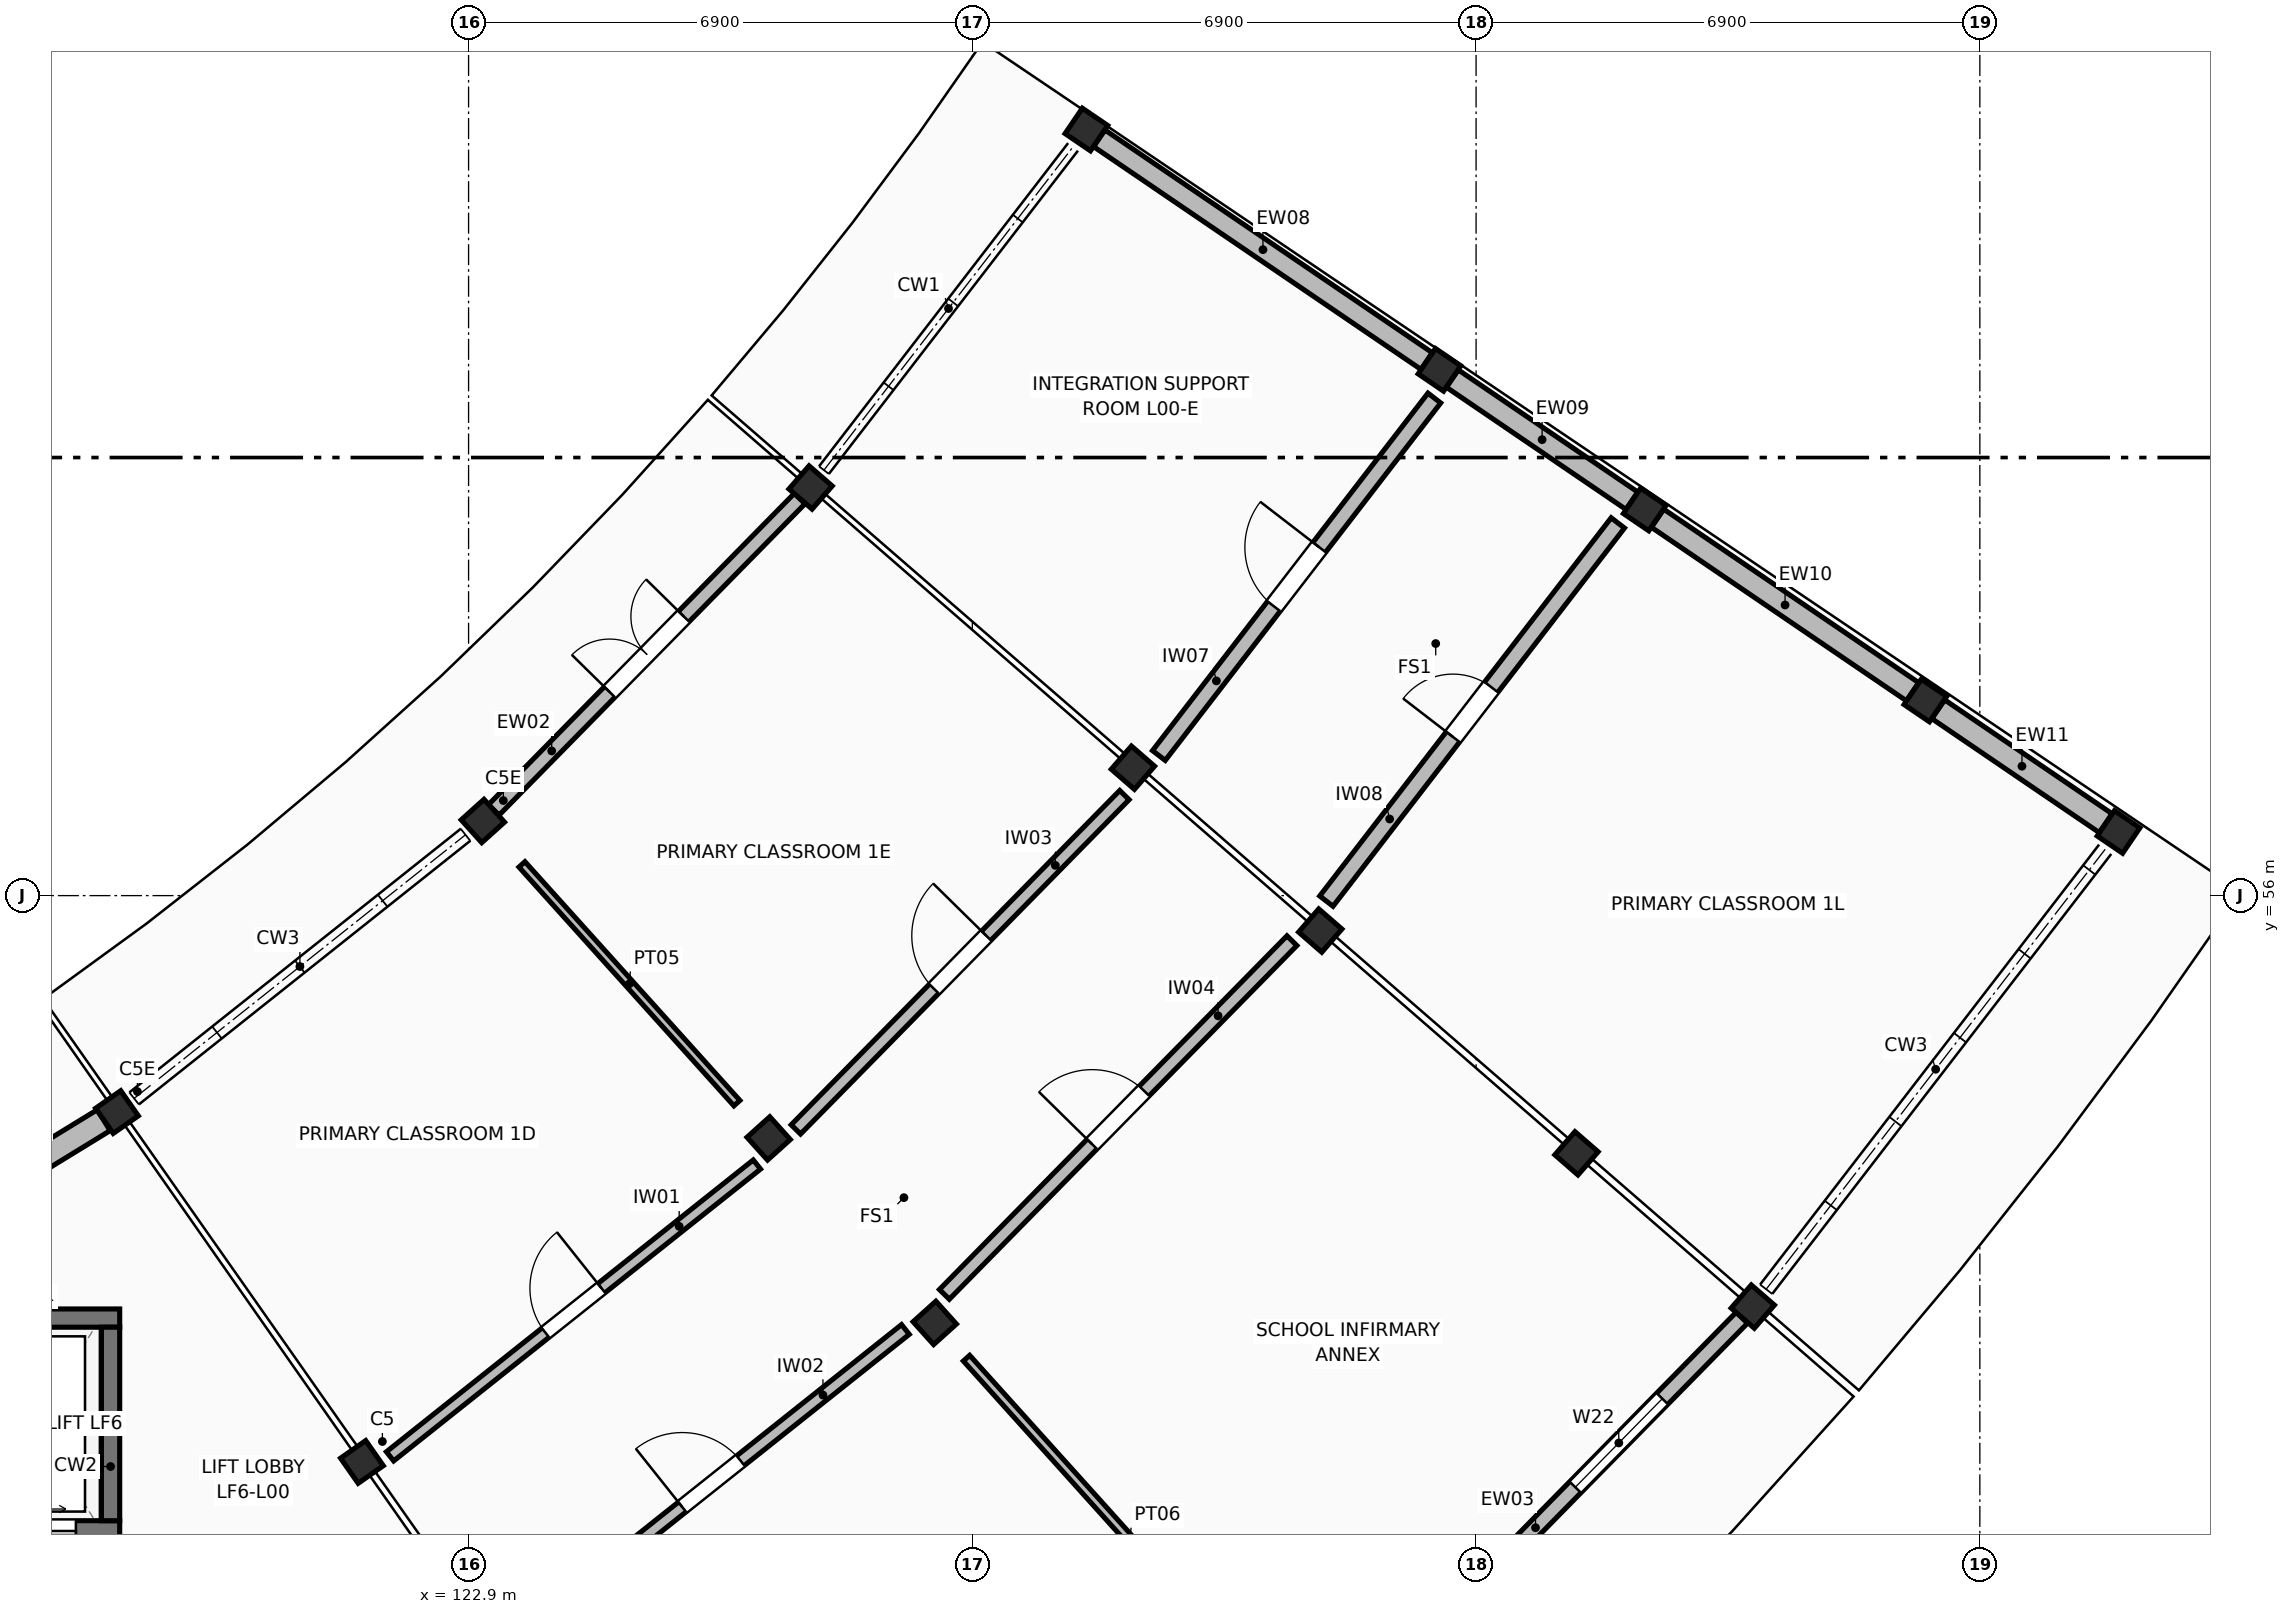
"""IFC4 building model, lengths in metres.
Left out: names, types, materials, properties, quantities, classifications, styles, units other than length and angle.
Written with IfcOpenShell. Run it as: python <this file> out.ifc"""

import sys

from ifc_helpers import new_model, si_unit, direction, frame, frame_2d, origin, origin_2d, place, context, subcontext, project, spatial, rectangle, extrude, element, fill, save


model = new_model("IFC4")
c1 = context("Model", 3, precision=1e-05, world=origin(), true_north=direction((0.0, 1.0)))
c2 = subcontext(c1, "Body", "Model", "MODEL_VIEW")
j1 = project(units=[si_unit("LENGTHUNIT", "METRE"), si_unit("PLANEANGLEUNIT", "RADIAN")], contexts=[c1])
p1 = place(None, origin())
s1 = spatial("IfcSite", under=j1, at=p1, CompositionType="ELEMENT")
p2 = place(p1, origin())
s2 = spatial("IfcBuilding", under=s1, at=p2, CompositionType="ELEMENT")
p3 = place(p2, origin())
s3 = spatial("IfcBuildingStorey", under=s2, at=p3, CompositionType="ELEMENT", Elevation=0.0)
for number, where, z_axis, x_axis in (
    (1, (118.084, 53.035, 0.0), (0.0, 0.0, 1.0), (0.574, -0.819, 0.0)),
    (2, (121.439, 48.243, 0.0), (0.0, 0.0, 1.0), (0.574, -0.819, 0.0)),
    (3, (123.096, 57.022, 0.0), (0.0, 0.0, 1.0), (0.669, -0.743, 0.0)),
    (4, (127.01, 52.675, 0.0), (0.0, 0.0, 1.0), (0.669, -0.743, 0.0)),
    (5, (129.285, 50.148, 0.0), (0.0, 0.0, 1.0), (0.669, -0.743, 0.0)),
    (6, (127.584, 61.59, 0.0), (0.0, 0.0, 1.0), (0.755, -0.656, 0.0)),
    (7, (132.0, 57.752, 0.0), (0.0, 0.0, 1.0), (0.755, -0.656, 0.0)),
    (8, (134.566, 55.521, 0.0), (0.0, 0.0, 1.0), (0.755, -0.656, 0.0)),
    (9, (138.075, 52.47, 0.0), (0.0, 0.0, 1.0), (0.755, -0.656, 0.0)),
    (10, (140.49, 50.371, 0.0), (0.0, 0.0, 1.0), (0.755, -0.656, 0.0)),
    (11, (131.363, 66.492, 0.0), (0.0, 0.0, 1.0), (0.827, -0.563, 0.0)),
    (12, (136.199, 63.201, 0.0), (0.0, 0.0, 1.0), (0.827, -0.563, 0.0)),
    (13, (139.01, 61.288, 0.0), (0.0, 0.0, 1.0), (0.827, -0.563, 0.0)),
    (14, (142.854, 58.672, 0.0), (0.0, 0.0, 1.0), (0.827, -0.563, 0.0)),
    (15, (145.5, 56.872, 0.0), (0.0, 0.0, 1.0), (0.827, -0.563, 0.0)),
):
    element("IfcColumn", number, at=place(p3, frame(where, z_axis=z_axis, x_axis=x_axis)), inside=s3, PredefinedType="COLUMN", context=c2, shape_type="SweptSolid", body=[
        extrude(rectangle(XDim=0.42, YDim=0.42, at=origin_2d()), origin(), (0.0, 0.0, 1.0), 4.42),
    ])
p4 = place(p3, frame((115.771, 50.214, 0.0), z_axis=(0.0, 0.0, 1.0), x_axis=(1.0, 0.0, 0.0)))
e16 = element("IfcWall", 16, at=p4, inside=s3, PredefinedType="SHEAR", context=c2, shape_type="SweptSolid", body=[
    extrude(rectangle(XDim=2.35, YDim=0.25, at=frame_2d((1.175, 0.0))), origin(), (0.0, 0.0, 1.0), 4.2),
])
p5 = place(p3, frame((115.771, 47.314, 0.0), z_axis=(0.0, 0.0, 1.0), x_axis=(1.0, 0.0, 0.0)))
e17 = element("IfcWall", 17, at=p5, inside=s3, PredefinedType="SHEAR", context=c2, shape_type="SweptSolid", body=[
    extrude(rectangle(XDim=2.35, YDim=0.25, at=frame_2d((1.175, 0.0))), origin(), (0.0, 0.0, 1.0), 4.2),
])
p6 = place(p5, frame((0.6, 0.0, 0.0)))
e18 = element("IfcOpeningElement", 18, at=p6, cuts=e17, PredefinedType="OPENING", context=c2, shape_type="SweptSolid", body=[
    extrude(rectangle(XDim=1.15, YDim=2.15, at=frame_2d((0.575, 1.075))), frame((0.0, 0.135, 0.0), z_axis=(0.0, -1.0, 0.0), x_axis=(1.0, 0.0, 0.0)), (0.0, 0.0, 1.0), 0.27),
])
p7 = place(p3, frame((117.996, 47.439, 0.0), z_axis=(0.0, 0.0, 1.0), x_axis=(0.0, 1.0, 0.0)))
e19 = element("IfcWall", 19, at=p7, inside=s3, PredefinedType="SHEAR", context=c2, shape_type="SweptSolid", body=[
    extrude(rectangle(XDim=2.65, YDim=0.25, at=frame_2d((1.325, 0.0))), origin(), (0.0, 0.0, 1.0), 4.2),
])
p8 = place(p3, frame((112.805, 49.801, 0.0), z_axis=(0.0, 0.0, 1.0), x_axis=(0.852659356221, 0.522467245145, 0.0)))
e20 = element("IfcWall", 20, at=p8, inside=s3, PredefinedType="STANDARD", context=c2, shape_type="SweptSolid", body=[
    extrude(rectangle(XDim=5.978, YDim=0.336, at=frame_2d((2.989, 0.0))), origin(), (0.0, 0.0, 1.0), 3.4),
])
p9 = place(p8, frame((2.014, 0.0, 0.0)))
e21 = element("IfcOpeningElement", 21, at=p9, cuts=e20, PredefinedType="OPENING", context=c2, shape_type="SweptSolid", body=[
    extrude(rectangle(XDim=1.95, YDim=2.28, at=frame_2d((0.975, 1.14))), frame((0.0, 0.178, 0.0), z_axis=(0.0, -1.0, 0.0), x_axis=(1.0, 0.0, 0.0)), (0.0, 0.0, 1.0), 0.356),
])
p10 = place(p3, frame((123.245, 57.174, 0.0), z_axis=(0.0, 0.0, 1.0), x_axis=(0.700933675957, 0.713226459064, 0.0)))
e22 = element("IfcWall", 22, at=p10, inside=s3, PredefinedType="STANDARD", context=c2, shape_type="SweptSolid", body=[
    extrude(rectangle(XDim=5.978, YDim=0.204, at=frame_2d((2.989, 0.0))), origin(), (0.0, 0.0, 1.0), 3.4),
])
p11 = place(p10, frame((2.264, 0.0, 0.0)))
e23 = element("IfcOpeningElement", 23, at=p11, cuts=e22, PredefinedType="OPENING", context=c2, shape_type="SweptSolid", body=[
    extrude(rectangle(XDim=1.45, YDim=2.22, at=frame_2d((0.725, 1.11))), frame((0.0, 0.112, 0.0), z_axis=(0.0, -1.0, 0.0), x_axis=(1.0, 0.0, 0.0)), (0.0, 0.0, 1.0), 0.224),
])
p12 = place(p3, frame((134.687, 44.466, 0.0), z_axis=(0.0, 0.0, 1.0), x_axis=(0.700920376985, 0.713239528578, 0.0)))
e24 = element("IfcWall", 24, at=p12, inside=s3, PredefinedType="STANDARD", context=c2, shape_type="SweptSolid", body=[
    extrude(rectangle(XDim=8.066, YDim=0.216, at=frame_2d((4.033, 0.0))), origin(), (0.0, 0.0, 1.0), 3.4),
])
p13 = place(p12, frame((1.555, 0.0, 0.95)))
e25 = element("IfcOpeningElement", 25, at=p13, cuts=e24, PredefinedType="OPENING", context=c2, shape_type="SweptSolid", body=[
    extrude(rectangle(XDim=1.7, YDim=1.3, at=frame_2d((0.85, 0.65))), frame((0.0, 0.118, 0.0), z_axis=(0.0, -1.0, 0.0), x_axis=(1.0, 0.0, 0.0)), (0.0, 0.0, 1.0), 0.236),
])
p14 = place(p12, frame((4.811, 0.0, 0.95)))
e26 = element("IfcOpeningElement", 26, at=p14, cuts=e24, PredefinedType="OPENING", context=c2, shape_type="SweptSolid", body=[
    extrude(rectangle(XDim=1.7, YDim=1.3, at=frame_2d((0.85, 0.65))), frame((0.0, 0.118, 0.0), z_axis=(0.0, -1.0, 0.0), x_axis=(1.0, 0.0, 0.0)), (0.0, 0.0, 1.0), 0.236),
])
p15 = place(p3, frame((131.539, 66.373, 0.0), z_axis=(0.0, 0.0, 1.0), x_axis=(0.826728872558, -0.562600543262, 0.0)))
e27 = element("IfcWall", 27, at=p15, inside=s3, PredefinedType="STANDARD", context=c2, shape_type="SweptSolid", body=[
    extrude(rectangle(XDim=5.424, YDim=0.276, at=frame_2d((2.712, 0.0))), origin(), (0.0, 0.0, 1.0), 3.4),
])
p16 = place(p3, frame((136.375, 63.081, 0.0), z_axis=(0.0, 0.0, 1.0), x_axis=(0.826746288828, -0.562574949592, 0.0)))
e28 = element("IfcWall", 28, at=p16, inside=s3, PredefinedType="STANDARD", context=c2, shape_type="SweptSolid", body=[
    extrude(rectangle(XDim=2.974, YDim=0.288, at=frame_2d((1.487, 0.0))), origin(), (0.0, 0.0, 1.0), 3.4),
])
p17 = place(p3, frame((139.186, 61.169, 0.0), z_axis=(0.0, 0.0, 1.0), x_axis=(0.826730801619, -0.56259770854, 0.0)))
e29 = element("IfcWall", 29, at=p17, inside=s3, PredefinedType="STANDARD", context=c2, shape_type="SweptSolid", body=[
    extrude(rectangle(XDim=4.224, YDim=0.3, at=frame_2d((2.112, 0.0))), origin(), (0.0, 0.0, 1.0), 3.4),
])
p18 = place(p3, frame((143.03, 58.552, 0.0), z_axis=(0.0, 0.0, 1.0), x_axis=(0.826731643037, -0.562596472085, 0.0)))
e30 = element("IfcWall", 30, at=p18, inside=s3, PredefinedType="STANDARD", context=c2, shape_type="SweptSolid", body=[
    extrude(rectangle(XDim=2.774, YDim=0.312, at=frame_2d((1.387, 0.0))), origin(), (0.0, 0.0, 1.0), 3.4),
])
p19 = place(p3, frame((121.824, 48.32, 0.0), z_axis=(0.0, 0.0, 1.0), x_axis=(0.782605685559, 0.622517743467, 0.0)))
e31 = element("IfcWall", 31, at=p19, inside=s3, PredefinedType="STANDARD", context=c2, shape_type="SweptSolid", body=[
    extrude(rectangle(XDim=6.42, YDim=0.16, at=frame_2d((3.21, 0.0))), origin(), (0.0, 0.0, 1.0), 3.38),
])
p20 = place(p19, frame((2.72, 0.0, 0.0)))
e32 = element("IfcOpeningElement", 32, at=p20, cuts=e31, PredefinedType="OPENING", context=c2, shape_type="SweptSolid", body=[
    extrude(rectangle(XDim=0.98, YDim=2.24, at=frame_2d((0.49, 1.12))), frame((0.0, 0.09, 0.0), z_axis=(0.0, -1.0, 0.0), x_axis=(1.0, 0.0, 0.0)), (0.0, 0.0, 1.0), 0.18),
])
p21 = place(p3, frame((123.568, 45.83, 0.0), z_axis=(0.0, 0.0, 1.0), x_axis=(0.782615780998, 0.622505051653, 0.0)))
e33 = element("IfcWall", 33, at=p21, inside=s3, PredefinedType="STANDARD", context=c2, shape_type="SweptSolid", body=[
    extrude(rectangle(XDim=6.792, YDim=0.17, at=frame_2d((3.396, 0.0))), origin(), (0.0, 0.0, 1.0), 3.38),
])
p22 = place(p21, frame((2.886, 0.0, 0.0)))
e34 = element("IfcOpeningElement", 34, at=p22, cuts=e33, PredefinedType="OPENING", context=c2, shape_type="SweptSolid", body=[
    extrude(rectangle(XDim=1.02, YDim=2.06, at=frame_2d((0.51, 1.03))), frame((0.0, 0.095, 0.0), z_axis=(0.0, -1.0, 0.0), x_axis=(1.0, 0.0, 0.0)), (0.0, 0.0, 1.0), 0.19),
])
p23 = place(p3, frame((127.383, 52.798, 0.0), z_axis=(0.0, 0.0, 1.0), x_axis=(0.700900509406, 0.713259052459, 0.0)))
e35 = element("IfcWall", 35, at=p23, inside=s3, PredefinedType="STANDARD", context=c2, shape_type="SweptSolid", body=[
    extrude(rectangle(XDim=6.42, YDim=0.18, at=frame_2d((3.21, 0.0))), origin(), (0.0, 0.0, 1.0), 3.38),
])
p24 = place(p23, frame((2.7, 0.0, 0.0)))
e36 = element("IfcOpeningElement", 36, at=p24, cuts=e35, PredefinedType="OPENING", context=c2, shape_type="SweptSolid", body=[
    extrude(rectangle(XDim=1.02, YDim=2.12, at=frame_2d((0.51, 1.06))), frame((0.0, 0.1, 0.0), z_axis=(0.0, -1.0, 0.0), x_axis=(1.0, 0.0, 0.0)), (0.0, 0.0, 1.0), 0.2),
])
p25 = place(p3, frame((129.417, 50.539, 0.0), z_axis=(0.0, 0.0, 1.0), x_axis=(0.700914816473, 0.713244993006, 0.0)))
e37 = element("IfcWall", 37, at=p25, inside=s3, PredefinedType="STANDARD", context=c2, shape_type="SweptSolid", body=[
    extrude(rectangle(XDim=6.792, YDim=0.19, at=frame_2d((3.396, 0.0))), origin(), (0.0, 0.0, 1.0), 3.38),
])
p26 = place(p25, frame((2.886, 0.0, 0.0)))
e38 = element("IfcOpeningElement", 38, at=p26, cuts=e37, PredefinedType="OPENING", context=c2, shape_type="SweptSolid", body=[
    extrude(rectangle(XDim=1.02, YDim=2.18, at=frame_2d((0.51, 1.09))), frame((0.0, 0.105, 0.0), z_axis=(0.0, -1.0, 0.0), x_axis=(1.0, 0.0, 0.0)), (0.0, 0.0, 1.0), 0.21),
])
p27 = place(p3, frame((123.631, 56.427, 0.0), z_axis=(0.0, 0.0, 1.0), x_axis=(0.669157836149, -0.743120306761, 0.0)))
e39 = element("IfcWall", 39, at=p27, inside=s3, PredefinedType="PARTITIONING", context=c2, shape_type="SweptSolid", body=[
    extrude(rectangle(XDim=4.4, YDim=0.11, at=frame_2d((2.2, 0.0))), origin(), (0.0, 0.0, 1.0), 3.38),
])
p28 = place(p3, frame((129.72, 49.665, 0.0), z_axis=(0.0, 0.0, 1.0), x_axis=(0.669115705072, -0.743158242386, 0.0)))
e40 = element("IfcWall", 40, at=p28, inside=s3, PredefinedType="PARTITIONING", context=c2, shape_type="SweptSolid", body=[
    extrude(rectangle(XDim=6.7, YDim=0.116, at=frame_2d((3.35, 0.0))), origin(), (0.0, 0.0, 1.0), 3.38),
])
p29 = place(p3, frame((132.355, 57.919, 0.0), z_axis=(0.0, 0.0, 1.0), x_axis=(0.610376740954, 0.79211125109, 0.0)))
e41 = element("IfcWall", 41, at=p29, inside=s3, PredefinedType="STANDARD", context=c2, shape_type="SweptSolid", body=[
    extrude(rectangle(XDim=6.181, YDim=0.22, at=frame_2d((3.09, 0.0))), origin(), (0.0, 0.0, 1.0), 3.38),
])
p30 = place(p29, frame((2.581, 0.0, 0.0)))
e42 = element("IfcOpeningElement", 42, at=p30, cuts=e41, PredefinedType="OPENING", context=c2, shape_type="SweptSolid", body=[
    extrude(rectangle(XDim=1.02, YDim=2.24, at=frame_2d((0.51, 1.12))), frame((0.0, 0.12, 0.0), z_axis=(0.0, -1.0, 0.0), x_axis=(1.0, 0.0, 0.0)), (0.0, 0.0, 1.0), 0.24),
])
p31 = place(p3, frame((134.649, 55.924, 0.0), z_axis=(0.0, 0.0, 1.0), x_axis=(0.610378079511, 0.792110219637, 0.0)))
e43 = element("IfcWall", 43, at=p31, inside=s3, PredefinedType="STANDARD", context=c2, shape_type="SweptSolid", body=[
    extrude(rectangle(XDim=6.54, YDim=0.23, at=frame_2d((3.27, 0.0))), origin(), (0.0, 0.0, 1.0), 3.38),
])
p32 = place(p31, frame((2.84, 0.0, 0.0)))
e44 = element("IfcOpeningElement", 44, at=p32, cuts=e43, PredefinedType="OPENING", context=c2, shape_type="SweptSolid", body=[
    extrude(rectangle(XDim=0.86, YDim=2.06, at=frame_2d((0.43, 1.03))), frame((0.0, 0.125, 0.0), z_axis=(0.0, -1.0, 0.0), x_axis=(1.0, 0.0, 0.0)), (0.0, 0.0, 1.0), 0.25),
])
p33 = place(p11, origin())
e45 = element("IfcDoor", 45, at=p33, inside=s3, OperationType="DOUBLE_DOOR_SINGLE_SWING", PredefinedType="DOOR", context=c2, shape_type="SweptSolid", body=[
    extrude(rectangle(XDim=1.45, YDim=2.22, at=frame_2d((0.725, 1.11))), frame((0.0, 0.025, 0.0), z_axis=(0.0, -1.0, 0.0), x_axis=(1.0, 0.0, 0.0)), (0.0, 0.0, 1.0), 0.05),
])
fill(e23, e45)
p34 = place(p14, origin())
e46 = element("IfcWindow", 46, at=p34, inside=s3, PartitioningType="SINGLE_PANEL", PredefinedType="WINDOW", context=c2, shape_type="SweptSolid", body=[
    extrude(rectangle(XDim=1.7, YDim=1.3, at=frame_2d((0.85, 0.65))), frame((0.0, 0.03, 0.0), z_axis=(0.0, -1.0, 0.0), x_axis=(1.0, 0.0, 0.0)), (0.0, 0.0, 1.0), 0.06),
])
fill(e26, e46)
p35 = place(p6, origin())
e47 = element("IfcDoor", 47, at=p35, inside=s3, OperationType="DOUBLE_DOOR_SLIDING", PredefinedType="DOOR", context=c2, shape_type="SweptSolid", body=[
    extrude(rectangle(XDim=1.15, YDim=2.15, at=frame_2d((0.575, 1.075))), frame((0.0, 0.025, 0.0), z_axis=(0.0, -1.0, 0.0), x_axis=(1.0, 0.0, 0.0)), (0.0, 0.0, 1.0), 0.05),
])
fill(e18, e47)
p36 = place(p20, frame((0.98, 0.0, 0.0), z_axis=(0.0, 0.0, 1.0), x_axis=(-1.0, 0.0, 0.0)))
e48 = element("IfcDoor", 48, at=p36, inside=s3, OperationType="SINGLE_SWING_RIGHT", PredefinedType="DOOR", context=c2, shape_type="SweptSolid", body=[
    extrude(rectangle(XDim=0.98, YDim=2.24, at=frame_2d((0.49, 1.12))), frame((0.0, 0.025, 0.0), z_axis=(0.0, -1.0, 0.0), x_axis=(1.0, 0.0, 0.0)), (0.0, 0.0, 1.0), 0.05),
])
fill(e32, e48)
p37 = place(p22, origin())
e49 = element("IfcDoor", 49, at=p37, inside=s3, OperationType="SINGLE_SWING_LEFT", PredefinedType="DOOR", context=c2, shape_type="SweptSolid", body=[
    extrude(rectangle(XDim=1.02, YDim=2.06, at=frame_2d((0.51, 1.03))), frame((0.0, 0.025, 0.0), z_axis=(0.0, -1.0, 0.0), x_axis=(1.0, 0.0, 0.0)), (0.0, 0.0, 1.0), 0.05),
])
fill(e34, e49)
p38 = place(p24, frame((1.02, 0.0, 0.0), z_axis=(0.0, 0.0, 1.0), x_axis=(-1.0, 0.0, 0.0)))
e50 = element("IfcDoor", 50, at=p38, inside=s3, OperationType="SINGLE_SWING_RIGHT", PredefinedType="DOOR", context=c2, shape_type="SweptSolid", body=[
    extrude(rectangle(XDim=1.02, YDim=2.12, at=frame_2d((0.51, 1.06))), frame((0.0, 0.025, 0.0), z_axis=(0.0, -1.0, 0.0), x_axis=(1.0, 0.0, 0.0)), (0.0, 0.0, 1.0), 0.05),
])
fill(e36, e50)
p39 = place(p26, origin())
e51 = element("IfcDoor", 51, at=p39, inside=s3, OperationType="SINGLE_SWING_LEFT", PredefinedType="DOOR", context=c2, shape_type="SweptSolid", body=[
    extrude(rectangle(XDim=1.02, YDim=2.18, at=frame_2d((0.51, 1.09))), frame((0.0, 0.025, 0.0), z_axis=(0.0, -1.0, 0.0), x_axis=(1.0, 0.0, 0.0)), (0.0, 0.0, 1.0), 0.05),
])
fill(e38, e51)
p40 = place(p30, frame((1.02, 0.0, 0.0), z_axis=(0.0, 0.0, 1.0), x_axis=(-1.0, 0.0, 0.0)))
e52 = element("IfcDoor", 52, at=p40, inside=s3, OperationType="SINGLE_SWING_RIGHT", PredefinedType="DOOR", context=c2, shape_type="SweptSolid", body=[
    extrude(rectangle(XDim=1.02, YDim=2.24, at=frame_2d((0.51, 1.12))), frame((0.0, 0.025, 0.0), z_axis=(0.0, -1.0, 0.0), x_axis=(1.0, 0.0, 0.0)), (0.0, 0.0, 1.0), 0.05),
])
fill(e42, e52)
p41 = place(p32, origin())
e53 = element("IfcDoor", 53, at=p41, inside=s3, OperationType="SINGLE_SWING_LEFT", PredefinedType="DOOR", context=c2, shape_type="SweptSolid", body=[
    extrude(rectangle(XDim=0.86, YDim=2.06, at=frame_2d((0.43, 1.03))), frame((0.0, 0.025, 0.0), z_axis=(0.0, -1.0, 0.0), x_axis=(1.0, 0.0, 0.0)), (0.0, 0.0, 1.0), 0.05),
])
fill(e44, e53)
save(model, sys.argv[1])
